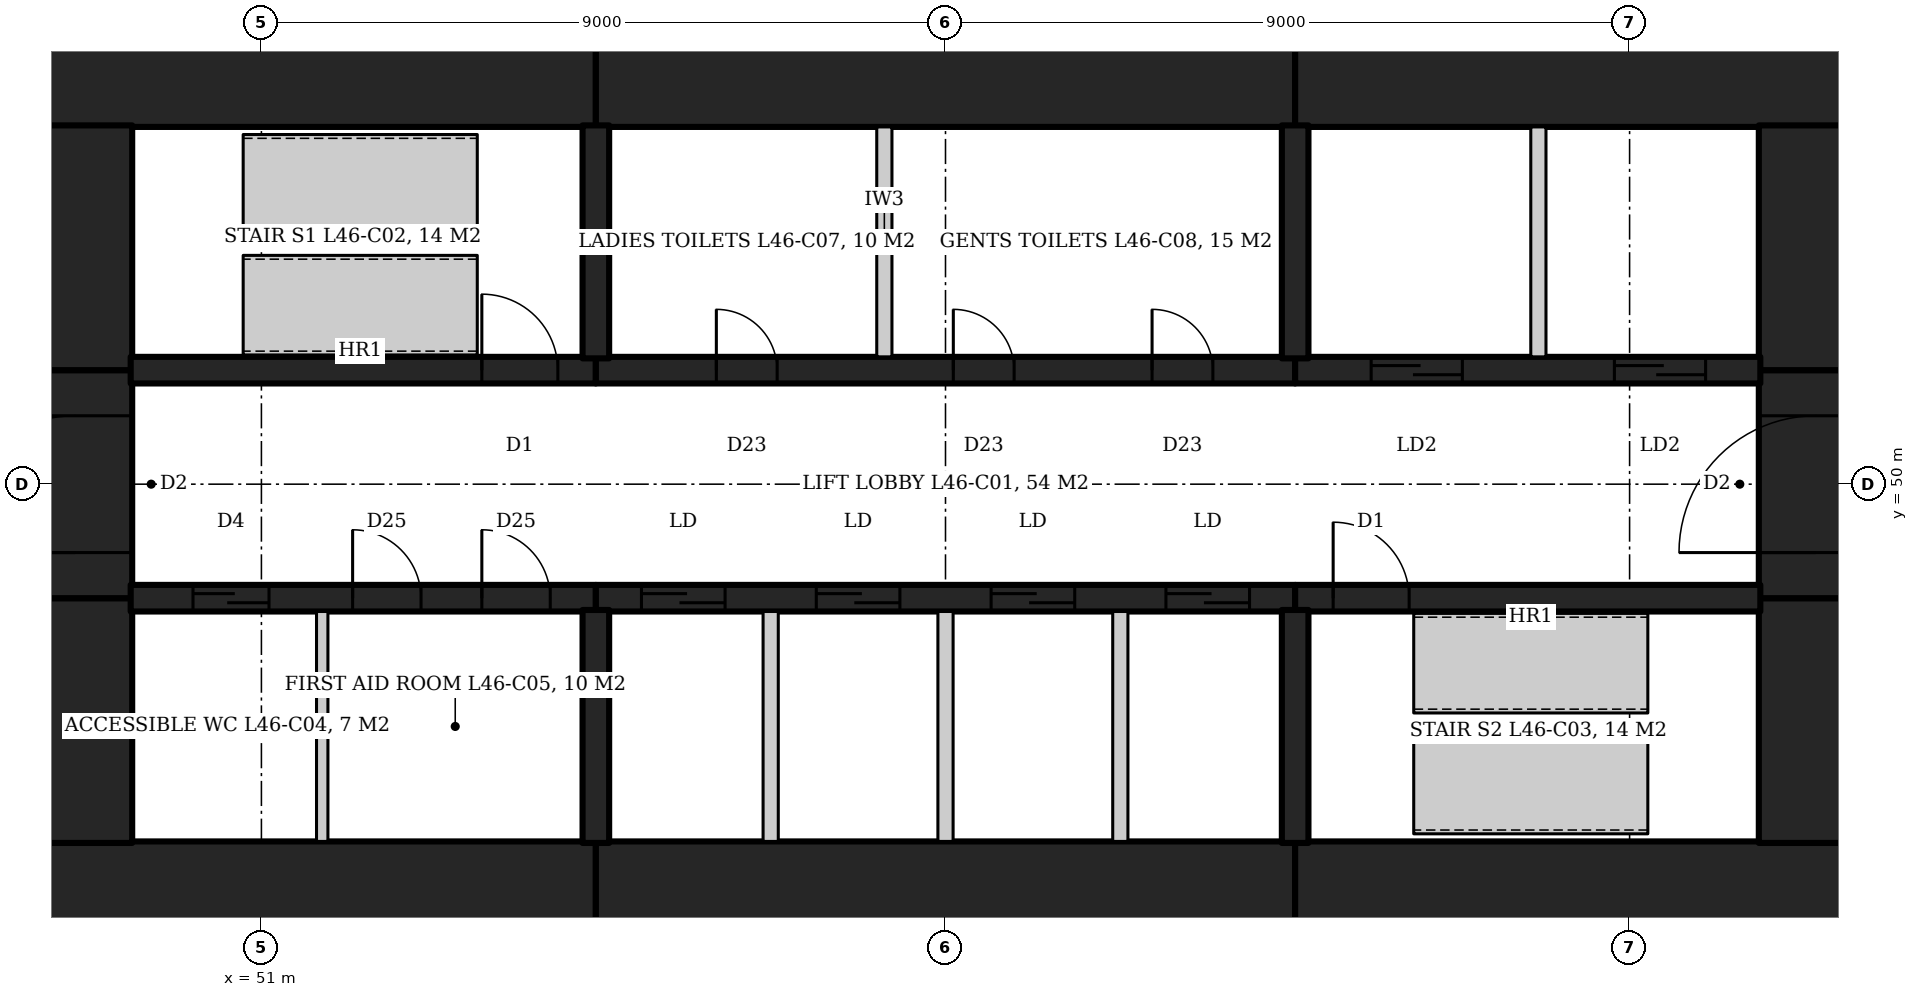
"""IFC4 building model, lengths in metres.
Left out: names, types, materials, properties, quantities, classifications, styles, units other than length and angle.
Written with IfcOpenShell. Run it as: python <this file> out.ifc"""

import sys

from ifc_helpers import new_model, si_unit, direction, frame, frame_2d, origin, place, context, subcontext, project, spatial, rectangle, extrude, element, fill, save


model = new_model("IFC4")
c1 = context("Model", 3, precision=1e-05, world=origin(), true_north=direction((0.0, 1.0)))
c2 = subcontext(c1, "Body", "Model", "MODEL_VIEW")
j1 = project(units=[si_unit("LENGTHUNIT", "METRE"), si_unit("PLANEANGLEUNIT", "RADIAN")], contexts=[c1])
p1 = place(None, origin())
s1 = spatial("IfcSite", under=j1, at=p1, CompositionType="ELEMENT")
p2 = place(p1, origin())
s2 = spatial("IfcBuilding", under=s1, at=p2, CompositionType="ELEMENT")
p3 = place(p2, frame((0.0, 0.0, 202.4)))
s3 = spatial("IfcBuildingStorey", under=s2, at=p3, CompositionType="ELEMENT", Elevation=202.4)
p4 = place(p3, frame((47.8, 55.45, 0.0), z_axis=(0.0, 0.0, 1.0), x_axis=(1.0, 0.0, 0.0)))
e1 = element("IfcWall", 1, at=p4, inside=s3, PredefinedType="SHEAR", context=c2, shape_type="SweptSolid", body=[
    extrude(rectangle(XDim=7.6, YDim=1.5, at=frame_2d((3.8, 0.0))), origin(), (0.0, 0.0, 1.0), 4.2),
])
p5 = place(p3, frame((55.4, 55.45, 0.0), z_axis=(0.0, 0.0, 1.0), x_axis=(1.0, 0.0, 0.0)))
e2 = element("IfcWall", 2, at=p5, inside=s3, PredefinedType="SHEAR", context=c2, shape_type="SweptSolid", body=[
    extrude(rectangle(XDim=9.2, YDim=1.5, at=frame_2d((4.6, 0.0))), origin(), (0.0, 0.0, 1.0), 4.2),
])
for number, where, z_axis, x_axis in (
    (3, (64.6, 55.45, 0.0), (0.0, 0.0, 1.0), (1.0, 0.0, 0.0)),
    (4, (47.8, 44.55, 0.0), (0.0, 0.0, 1.0), (1.0, 0.0, 0.0)),
):
    element("IfcWall", number, at=place(p3, frame(where, z_axis=z_axis, x_axis=x_axis)), inside=s3, PredefinedType="SHEAR", context=c2, shape_type="SweptSolid", body=[
        extrude(rectangle(XDim=7.6, YDim=1.5, at=frame_2d((3.8, 0.0))), origin(), (0.0, 0.0, 1.0), 4.2),
    ])
p6 = place(p3, frame((55.4, 44.55, 0.0), z_axis=(0.0, 0.0, 1.0), x_axis=(1.0, 0.0, 0.0)))
e5 = element("IfcWall", 5, at=p6, inside=s3, PredefinedType="SHEAR", context=c2, shape_type="SweptSolid", body=[
    extrude(rectangle(XDim=9.2, YDim=1.5, at=frame_2d((4.6, 0.0))), origin(), (0.0, 0.0, 1.0), 4.2),
])
p7 = place(p3, frame((64.6, 44.55, 0.0), z_axis=(0.0, 0.0, 1.0), x_axis=(1.0, 0.0, 0.0)))
e6 = element("IfcWall", 6, at=p7, inside=s3, PredefinedType="SHEAR", context=c2, shape_type="SweptSolid", body=[
    extrude(rectangle(XDim=7.6, YDim=1.5, at=frame_2d((3.8, 0.0))), origin(), (0.0, 0.0, 1.0), 4.2),
])
p8 = place(p3, frame((71.45, 45.28, 0.0), z_axis=(0.0, 0.0, 1.0), x_axis=(0.0, 1.0, 0.0)))
e7 = element("IfcWall", 7, at=p8, inside=s3, PredefinedType="SHEAR", context=c2, shape_type="SweptSolid", body=[
    extrude(rectangle(XDim=3.22, YDim=1.5, at=frame_2d((1.61, 0.0))), origin(), (0.0, 0.0, 1.0), 4.2),
])
p9 = place(p3, frame((71.45, 48.5, 0.0), z_axis=(0.0, 0.0, 1.0), x_axis=(0.0, 1.0, 0.0)))
e8 = element("IfcWall", 8, at=p9, inside=s3, PredefinedType="SHEAR", context=c2, shape_type="SweptSolid", body=[
    extrude(rectangle(XDim=3.0, YDim=1.5, at=frame_2d((1.5, 0.0))), origin(), (0.0, 0.0, 1.0), 4.2),
])
p10 = place(p9, frame((0.6, 0.0, 0.0)))
e9 = element("IfcOpeningElement", 9, at=p10, cuts=e8, PredefinedType="OPENING", context=c2, shape_type="SweptSolid", body=[
    extrude(rectangle(XDim=1.8, YDim=2.1, at=frame_2d((0.9, 1.05))), frame((0.0, 0.76, 0.0), z_axis=(0.0, -1.0, 0.0), x_axis=(1.0, 0.0, 0.0)), (0.0, 0.0, 1.0), 1.52),
])
for number, where, z_axis, x_axis in (
    (10, (71.45, 51.5, 0.0), (0.0, 0.0, 1.0), (0.0, 1.0, 0.0)),
    (11, (48.55, 45.28, 0.0), (0.0, 0.0, 1.0), (0.0, 1.0, 0.0)),
):
    element("IfcWall", number, at=place(p3, frame(where, z_axis=z_axis, x_axis=x_axis)), inside=s3, PredefinedType="SHEAR", context=c2, shape_type="SweptSolid", body=[
        extrude(rectangle(XDim=3.22, YDim=1.5, at=frame_2d((1.61, 0.0))), origin(), (0.0, 0.0, 1.0), 4.2),
    ])
p11 = place(p3, frame((48.55, 48.5, 0.0), z_axis=(0.0, 0.0, 1.0), x_axis=(0.0, 1.0, 0.0)))
e12 = element("IfcWall", 12, at=p11, inside=s3, PredefinedType="SHEAR", context=c2, shape_type="SweptSolid", body=[
    extrude(rectangle(XDim=3.0, YDim=1.5, at=frame_2d((1.5, 0.0))), origin(), (0.0, 0.0, 1.0), 4.2),
])
p12 = place(p11, frame((0.6, 0.0, 0.0)))
e13 = element("IfcOpeningElement", 13, at=p12, cuts=e12, PredefinedType="OPENING", context=c2, shape_type="SweptSolid", body=[
    extrude(rectangle(XDim=1.8, YDim=2.1, at=frame_2d((0.9, 1.05))), frame((0.0, 0.76, 0.0), z_axis=(0.0, -1.0, 0.0), x_axis=(1.0, 0.0, 0.0)), (0.0, 0.0, 1.0), 1.52),
])
p13 = place(p3, frame((48.55, 51.5, 0.0), z_axis=(0.0, 0.0, 1.0), x_axis=(0.0, 1.0, 0.0)))
e14 = element("IfcWall", 14, at=p13, inside=s3, PredefinedType="SHEAR", context=c2, shape_type="SweptSolid", body=[
    extrude(rectangle(XDim=3.22, YDim=1.5, at=frame_2d((1.61, 0.0))), origin(), (0.0, 0.0, 1.0), 4.2),
])
p14 = place(p3, frame((49.28, 51.5, 0.0), z_axis=(0.0, 0.0, 1.0), x_axis=(1.0, 0.0, 0.0)))
e15 = element("IfcWall", 15, at=p14, inside=s3, PredefinedType="SHEAR", context=c2, shape_type="SweptSolid", body=[
    extrude(rectangle(XDim=6.12, YDim=0.35, at=frame_2d((3.06, 0.0))), origin(), (0.0, 0.0, 1.0), 4.2),
])
p15 = place(p14, frame((4.62, 0.0, 0.0)))
e16 = element("IfcOpeningElement", 16, at=p15, cuts=e15, PredefinedType="OPENING", context=c2, shape_type="SweptSolid", body=[
    extrude(rectangle(XDim=1.0, YDim=2.1, at=frame_2d((0.5, 1.05))), frame((0.0, 0.185, 0.0), z_axis=(0.0, -1.0, 0.0), x_axis=(1.0, 0.0, 0.0)), (0.0, 0.0, 1.0), 0.37),
])
p16 = place(p3, frame((55.4, 51.5, 0.0), z_axis=(0.0, 0.0, 1.0), x_axis=(1.0, 0.0, 0.0)))
e17 = element("IfcWall", 17, at=p16, inside=s3, PredefinedType="SHEAR", context=c2, shape_type="SweptSolid", body=[
    extrude(rectangle(XDim=9.2, YDim=0.35, at=frame_2d((4.6, 0.0))), origin(), (0.0, 0.0, 1.0), 4.2),
])
p17 = place(p16, frame((1.585, 0.0, 0.0)))
e18 = element("IfcOpeningElement", 18, at=p17, cuts=e17, PredefinedType="OPENING", context=c2, shape_type="SweptSolid", body=[
    extrude(rectangle(XDim=0.8, YDim=2.1, at=frame_2d((0.4, 1.05))), frame((0.0, 0.185, 0.0), z_axis=(0.0, -1.0, 0.0), x_axis=(1.0, 0.0, 0.0)), (0.0, 0.0, 1.0), 0.37),
])
p18 = place(p16, frame((4.703, 0.0, 0.0)))
e19 = element("IfcOpeningElement", 19, at=p18, cuts=e17, PredefinedType="OPENING", context=c2, shape_type="SweptSolid", body=[
    extrude(rectangle(XDim=0.8, YDim=2.1, at=frame_2d((0.4, 1.05))), frame((0.0, 0.185, 0.0), z_axis=(0.0, -1.0, 0.0), x_axis=(1.0, 0.0, 0.0)), (0.0, 0.0, 1.0), 0.37),
])
p19 = place(p16, frame((7.318, 0.0, 0.0)))
e20 = element("IfcOpeningElement", 20, at=p19, cuts=e17, PredefinedType="OPENING", context=c2, shape_type="SweptSolid", body=[
    extrude(rectangle(XDim=0.8, YDim=2.1, at=frame_2d((0.4, 1.05))), frame((0.0, 0.185, 0.0), z_axis=(0.0, -1.0, 0.0), x_axis=(1.0, 0.0, 0.0)), (0.0, 0.0, 1.0), 0.37),
])
p20 = place(p3, frame((64.6, 51.5, 0.0), z_axis=(0.0, 0.0, 1.0), x_axis=(1.0, 0.0, 0.0)))
e21 = element("IfcWall", 21, at=p20, inside=s3, PredefinedType="SHEAR", context=c2, shape_type="SweptSolid", body=[
    extrude(rectangle(XDim=6.12, YDim=0.35, at=frame_2d((3.06, 0.0))), origin(), (0.0, 0.0, 1.0), 4.2),
])
p21 = place(p20, frame((1.0, 0.0, 0.0)))
e22 = element("IfcOpeningElement", 22, at=p21, cuts=e21, PredefinedType="OPENING", context=c2, shape_type="SweptSolid", body=[
    extrude(rectangle(XDim=1.2, YDim=2.1, at=frame_2d((0.6, 1.05))), frame((0.0, 0.185, 0.0), z_axis=(0.0, -1.0, 0.0), x_axis=(1.0, 0.0, 0.0)), (0.0, 0.0, 1.0), 0.37),
])
p22 = place(p20, frame((4.2, 0.0, 0.0)))
e23 = element("IfcOpeningElement", 23, at=p22, cuts=e21, PredefinedType="OPENING", context=c2, shape_type="SweptSolid", body=[
    extrude(rectangle(XDim=1.2, YDim=2.1, at=frame_2d((0.6, 1.05))), frame((0.0, 0.185, 0.0), z_axis=(0.0, -1.0, 0.0), x_axis=(1.0, 0.0, 0.0)), (0.0, 0.0, 1.0), 0.37),
])
p23 = place(p3, frame((49.28, 48.5, 0.0), z_axis=(0.0, 0.0, 1.0), x_axis=(1.0, 0.0, 0.0)))
e24 = element("IfcWall", 24, at=p23, inside=s3, PredefinedType="SHEAR", context=c2, shape_type="SweptSolid", body=[
    extrude(rectangle(XDim=6.12, YDim=0.35, at=frame_2d((3.06, 0.0))), origin(), (0.0, 0.0, 1.0), 4.2),
])
p24 = place(p23, frame((0.82, 0.0, 0.0)))
e25 = element("IfcOpeningElement", 25, at=p24, cuts=e24, PredefinedType="OPENING", context=c2, shape_type="SweptSolid", body=[
    extrude(rectangle(XDim=1.0, YDim=2.1, at=frame_2d((0.5, 1.05))), frame((0.0, 0.185, 0.0), z_axis=(0.0, -1.0, 0.0), x_axis=(1.0, 0.0, 0.0)), (0.0, 0.0, 1.0), 0.37),
])
p25 = place(p23, frame((2.92, 0.0, 0.0)))
e26 = element("IfcOpeningElement", 26, at=p25, cuts=e24, PredefinedType="OPENING", context=c2, shape_type="SweptSolid", body=[
    extrude(rectangle(XDim=0.9, YDim=2.1, at=frame_2d((0.45, 1.05))), frame((0.0, 0.185, 0.0), z_axis=(0.0, -1.0, 0.0), x_axis=(1.0, 0.0, 0.0)), (0.0, 0.0, 1.0), 0.37),
])
p26 = place(p23, frame((4.62, 0.0, 0.0)))
e27 = element("IfcOpeningElement", 27, at=p26, cuts=e24, PredefinedType="OPENING", context=c2, shape_type="SweptSolid", body=[
    extrude(rectangle(XDim=0.9, YDim=2.1, at=frame_2d((0.45, 1.05))), frame((0.0, 0.185, 0.0), z_axis=(0.0, -1.0, 0.0), x_axis=(1.0, 0.0, 0.0)), (0.0, 0.0, 1.0), 0.37),
])
p27 = place(p3, frame((55.4, 48.5, 0.0), z_axis=(0.0, 0.0, 1.0), x_axis=(1.0, 0.0, 0.0)))
e28 = element("IfcWall", 28, at=p27, inside=s3, PredefinedType="SHEAR", context=c2, shape_type="SweptSolid", body=[
    extrude(rectangle(XDim=9.2, YDim=0.35, at=frame_2d((4.6, 0.0))), origin(), (0.0, 0.0, 1.0), 4.2),
])
p28 = place(p27, frame((0.6, 0.0, 0.0)))
e29 = element("IfcOpeningElement", 29, at=p28, cuts=e28, PredefinedType="OPENING", context=c2, shape_type="SweptSolid", body=[
    extrude(rectangle(XDim=1.1, YDim=2.1, at=frame_2d((0.55, 1.05))), frame((0.0, 0.185, 0.0), z_axis=(0.0, -1.0, 0.0), x_axis=(1.0, 0.0, 0.0)), (0.0, 0.0, 1.0), 0.37),
])
p29 = place(p27, frame((2.9, 0.0, 0.0)))
e30 = element("IfcOpeningElement", 30, at=p29, cuts=e28, PredefinedType="OPENING", context=c2, shape_type="SweptSolid", body=[
    extrude(rectangle(XDim=1.1, YDim=2.1, at=frame_2d((0.55, 1.05))), frame((0.0, 0.185, 0.0), z_axis=(0.0, -1.0, 0.0), x_axis=(1.0, 0.0, 0.0)), (0.0, 0.0, 1.0), 0.37),
])
p30 = place(p27, frame((5.2, 0.0, 0.0)))
e31 = element("IfcOpeningElement", 31, at=p30, cuts=e28, PredefinedType="OPENING", context=c2, shape_type="SweptSolid", body=[
    extrude(rectangle(XDim=1.1, YDim=2.1, at=frame_2d((0.55, 1.05))), frame((0.0, 0.185, 0.0), z_axis=(0.0, -1.0, 0.0), x_axis=(1.0, 0.0, 0.0)), (0.0, 0.0, 1.0), 0.37),
])
p31 = place(p27, frame((7.5, 0.0, 0.0)))
e32 = element("IfcOpeningElement", 32, at=p31, cuts=e28, PredefinedType="OPENING", context=c2, shape_type="SweptSolid", body=[
    extrude(rectangle(XDim=1.1, YDim=2.1, at=frame_2d((0.55, 1.05))), frame((0.0, 0.185, 0.0), z_axis=(0.0, -1.0, 0.0), x_axis=(1.0, 0.0, 0.0)), (0.0, 0.0, 1.0), 0.37),
])
p32 = place(p3, frame((64.6, 48.5, 0.0), z_axis=(0.0, 0.0, 1.0), x_axis=(1.0, 0.0, 0.0)))
e33 = element("IfcWall", 33, at=p32, inside=s3, PredefinedType="SHEAR", context=c2, shape_type="SweptSolid", body=[
    extrude(rectangle(XDim=6.12, YDim=0.35, at=frame_2d((3.06, 0.0))), origin(), (0.0, 0.0, 1.0), 4.2),
])
p33 = place(p32, frame((0.5, 0.0, 0.0)))
e34 = element("IfcOpeningElement", 34, at=p33, cuts=e33, PredefinedType="OPENING", context=c2, shape_type="SweptSolid", body=[
    extrude(rectangle(XDim=1.0, YDim=2.1, at=frame_2d((0.5, 1.05))), frame((0.0, 0.185, 0.0), z_axis=(0.0, -1.0, 0.0), x_axis=(1.0, 0.0, 0.0)), (0.0, 0.0, 1.0), 0.37),
])
for number, where, z_axis, x_axis in (
    (35, (55.4, 51.655, 0.0), (0.0, 0.0, 1.0), (0.0, 1.0, 0.0)),
    (36, (64.6, 51.655, 0.0), (0.0, 0.0, 1.0), (0.0, 1.0, 0.0)),
    (37, (55.4, 48.345, 0.0), (0.0, 0.0, 1.0), (0.0, -1.0, 0.0)),
    (38, (64.6, 48.345, 0.0), (0.0, 0.0, 1.0), (0.0, -1.0, 0.0)),
):
    element("IfcWall", number, at=place(p3, frame(where, z_axis=z_axis, x_axis=x_axis)), inside=s3, PredefinedType="SHEAR", context=c2, shape_type="SweptSolid", body=[
        extrude(rectangle(XDim=3.065, YDim=0.35, at=frame_2d((1.532, 0.0))), origin(), (0.0, 0.0, 1.0), 4.2),
    ])
for number, where, z_axis, x_axis in (
    (39, (57.7, 45.3, 0.0), (0.0, 0.0, 1.0), (0.0, 1.0, 0.0)),
    (40, (60.0, 45.3, 0.0), (0.0, 0.0, 1.0), (0.0, 1.0, 0.0)),
    (41, (62.3, 45.3, 0.0), (0.0, 0.0, 1.0), (0.0, 1.0, 0.0)),
    (42, (67.8, 51.675, 0.0), (0.0, 0.0, 1.0), (0.0, 1.0, 0.0)),
):
    element("IfcWall", number, at=place(p3, frame(where, z_axis=z_axis, x_axis=x_axis)), inside=s3, PredefinedType="PARTITIONING", context=c2, shape_type="SweptSolid", body=[
        extrude(rectangle(XDim=3.025, YDim=0.2, at=frame_2d((1.512, 0.0))), origin(), (0.0, 0.0, 1.0), 4.2),
    ])
p34 = place(p3, frame((51.8, 45.3, 0.0), z_axis=(0.0, 0.0, 1.0), x_axis=(0.0, 1.0, 0.0)))
e43 = element("IfcWall", 43, at=p34, inside=s3, PredefinedType="PARTITIONING", context=c2, shape_type="SweptSolid", body=[
    extrude(rectangle(XDim=3.025, YDim=0.15, at=frame_2d((1.512, 0.0))), origin(), (0.0, 0.0, 1.0), 4.04),
])
p35 = place(p3, frame((59.196, 51.675, 0.0), z_axis=(0.0, 0.0, 1.0), x_axis=(0.0, 1.0, 0.0)))
e44 = element("IfcWall", 44, at=p35, inside=s3, PredefinedType="PARTITIONING", context=c2, shape_type="SweptSolid", body=[
    extrude(rectangle(XDim=3.025, YDim=0.2, at=frame_2d((1.512, 0.0))), origin(), (0.0, 0.0, 1.0), 4.04),
])
p36 = place(p15, origin())
e45 = element("IfcDoor", 45, at=p36, inside=s3, OperationType="SINGLE_SWING_LEFT", PredefinedType="DOOR", context=c2, shape_type="SweptSolid", body=[
    extrude(rectangle(XDim=1.0, YDim=2.1, at=frame_2d((0.5, 1.05))), frame((0.0, 0.025, 0.0), z_axis=(0.0, -1.0, 0.0), x_axis=(1.0, 0.0, 0.0)), (0.0, 0.0, 1.0), 0.05),
])
fill(e16, e45)
p37 = place(p33, origin())
e46 = element("IfcDoor", 46, at=p37, inside=s3, OperationType="SINGLE_SWING_LEFT", PredefinedType="DOOR", context=c2, shape_type="SweptSolid", body=[
    extrude(rectangle(XDim=1.0, YDim=2.1, at=frame_2d((0.5, 1.05))), frame((0.0, 0.025, 0.0), z_axis=(0.0, -1.0, 0.0), x_axis=(1.0, 0.0, 0.0)), (0.0, 0.0, 1.0), 0.05),
])
fill(e34, e46)
p38 = place(p21, origin())
e47 = element("IfcDoor", 47, at=p38, inside=s3, OperationType="SLIDING_TO_LEFT", PredefinedType="DOOR", context=c2, shape_type="SweptSolid", body=[
    extrude(rectangle(XDim=1.2, YDim=2.1, at=frame_2d((0.6, 1.05))), frame((0.0, 0.025, 0.0), z_axis=(0.0, -1.0, 0.0), x_axis=(1.0, 0.0, 0.0)), (0.0, 0.0, 1.0), 0.05),
])
fill(e22, e47)
p39 = place(p22, origin())
e48 = element("IfcDoor", 48, at=p39, inside=s3, OperationType="SLIDING_TO_LEFT", PredefinedType="DOOR", context=c2, shape_type="SweptSolid", body=[
    extrude(rectangle(XDim=1.2, YDim=2.1, at=frame_2d((0.6, 1.05))), frame((0.0, 0.025, 0.0), z_axis=(0.0, -1.0, 0.0), x_axis=(1.0, 0.0, 0.0)), (0.0, 0.0, 1.0), 0.05),
])
fill(e23, e48)
p40 = place(p28, origin())
e49 = element("IfcDoor", 49, at=p40, inside=s3, OperationType="SLIDING_TO_LEFT", PredefinedType="DOOR", context=c2, shape_type="SweptSolid", body=[
    extrude(rectangle(XDim=1.1, YDim=2.1, at=frame_2d((0.55, 1.05))), frame((0.0, 0.025, 0.0), z_axis=(0.0, -1.0, 0.0), x_axis=(1.0, 0.0, 0.0)), (0.0, 0.0, 1.0), 0.05),
])
fill(e29, e49)
p41 = place(p29, origin())
e50 = element("IfcDoor", 50, at=p41, inside=s3, OperationType="SLIDING_TO_LEFT", PredefinedType="DOOR", context=c2, shape_type="SweptSolid", body=[
    extrude(rectangle(XDim=1.1, YDim=2.1, at=frame_2d((0.55, 1.05))), frame((0.0, 0.025, 0.0), z_axis=(0.0, -1.0, 0.0), x_axis=(1.0, 0.0, 0.0)), (0.0, 0.0, 1.0), 0.05),
])
fill(e30, e50)
p42 = place(p30, origin())
e51 = element("IfcDoor", 51, at=p42, inside=s3, OperationType="SLIDING_TO_LEFT", PredefinedType="DOOR", context=c2, shape_type="SweptSolid", body=[
    extrude(rectangle(XDim=1.1, YDim=2.1, at=frame_2d((0.55, 1.05))), frame((0.0, 0.025, 0.0), z_axis=(0.0, -1.0, 0.0), x_axis=(1.0, 0.0, 0.0)), (0.0, 0.0, 1.0), 0.05),
])
fill(e31, e51)
p43 = place(p31, origin())
e52 = element("IfcDoor", 52, at=p43, inside=s3, OperationType="SLIDING_TO_LEFT", PredefinedType="DOOR", context=c2, shape_type="SweptSolid", body=[
    extrude(rectangle(XDim=1.1, YDim=2.1, at=frame_2d((0.55, 1.05))), frame((0.0, 0.025, 0.0), z_axis=(0.0, -1.0, 0.0), x_axis=(1.0, 0.0, 0.0)), (0.0, 0.0, 1.0), 0.05),
])
fill(e32, e52)
p44 = place(p24, origin())
e53 = element("IfcDoor", 53, at=p44, inside=s3, OperationType="SLIDING_TO_LEFT", PredefinedType="DOOR", context=c2, shape_type="SweptSolid", body=[
    extrude(rectangle(XDim=1.0, YDim=2.1, at=frame_2d((0.5, 1.05))), frame((0.0, 0.025, 0.0), z_axis=(0.0, -1.0, 0.0), x_axis=(1.0, 0.0, 0.0)), (0.0, 0.0, 1.0), 0.05),
])
fill(e25, e53)
p45 = place(p25, origin())
e54 = element("IfcDoor", 54, at=p45, inside=s3, OperationType="SINGLE_SWING_RIGHT", PredefinedType="DOOR", context=c2, shape_type="SweptSolid", body=[
    extrude(rectangle(XDim=0.9, YDim=2.1, at=frame_2d((0.45, 1.05))), frame((0.0, 0.025, 0.0), z_axis=(0.0, -1.0, 0.0), x_axis=(1.0, 0.0, 0.0)), (0.0, 0.0, 1.0), 0.05),
])
fill(e26, e54)
p46 = place(p26, origin())
e55 = element("IfcDoor", 55, at=p46, inside=s3, OperationType="SINGLE_SWING_RIGHT", PredefinedType="DOOR", context=c2, shape_type="SweptSolid", body=[
    extrude(rectangle(XDim=0.9, YDim=2.1, at=frame_2d((0.45, 1.05))), frame((0.0, 0.025, 0.0), z_axis=(0.0, -1.0, 0.0), x_axis=(1.0, 0.0, 0.0)), (0.0, 0.0, 1.0), 0.05),
])
fill(e27, e55)
p47 = place(p10, origin())
e56 = element("IfcDoor", 56, at=p47, inside=s3, OperationType="DOUBLE_DOOR_DOUBLE_SWING", PredefinedType="DOOR", context=c2, shape_type="SweptSolid", body=[
    extrude(rectangle(XDim=1.8, YDim=2.1, at=frame_2d((0.9, 1.05))), frame((0.0, 0.025, 0.0), z_axis=(0.0, -1.0, 0.0), x_axis=(1.0, 0.0, 0.0)), (0.0, 0.0, 1.0), 0.05),
])
fill(e9, e56)
p48 = place(p12, origin())
e57 = element("IfcDoor", 57, at=p48, inside=s3, OperationType="DOUBLE_DOOR_DOUBLE_SWING", PredefinedType="DOOR", context=c2, shape_type="SweptSolid", body=[
    extrude(rectangle(XDim=1.8, YDim=2.1, at=frame_2d((0.9, 1.05))), frame((0.0, 0.025, 0.0), z_axis=(0.0, -1.0, 0.0), x_axis=(1.0, 0.0, 0.0)), (0.0, 0.0, 1.0), 0.05),
])
fill(e13, e57)
p49 = place(p17, origin())
e58 = element("IfcDoor", 58, at=p49, inside=s3, OperationType="SINGLE_SWING_LEFT", PredefinedType="DOOR", context=c2, shape_type="SweptSolid", body=[
    extrude(rectangle(XDim=0.8, YDim=2.1, at=frame_2d((0.4, 1.05))), frame((0.0, 0.025, 0.0), z_axis=(0.0, -1.0, 0.0), x_axis=(1.0, 0.0, 0.0)), (0.0, 0.0, 1.0), 0.05),
])
fill(e18, e58)
p50 = place(p18, origin())
e59 = element("IfcDoor", 59, at=p50, inside=s3, OperationType="SINGLE_SWING_LEFT", PredefinedType="DOOR", context=c2, shape_type="SweptSolid", body=[
    extrude(rectangle(XDim=0.8, YDim=2.1, at=frame_2d((0.4, 1.05))), frame((0.0, 0.025, 0.0), z_axis=(0.0, -1.0, 0.0), x_axis=(1.0, 0.0, 0.0)), (0.0, 0.0, 1.0), 0.05),
])
fill(e19, e59)
p51 = place(p19, origin())
e60 = element("IfcDoor", 60, at=p51, inside=s3, OperationType="SINGLE_SWING_LEFT", PredefinedType="DOOR", context=c2, shape_type="SweptSolid", body=[
    extrude(rectangle(XDim=0.8, YDim=2.1, at=frame_2d((0.4, 1.05))), frame((0.0, 0.025, 0.0), z_axis=(0.0, -1.0, 0.0), x_axis=(1.0, 0.0, 0.0)), (0.0, 0.0, 1.0), 0.05),
])
fill(e20, e60)
save(model, sys.argv[1])
